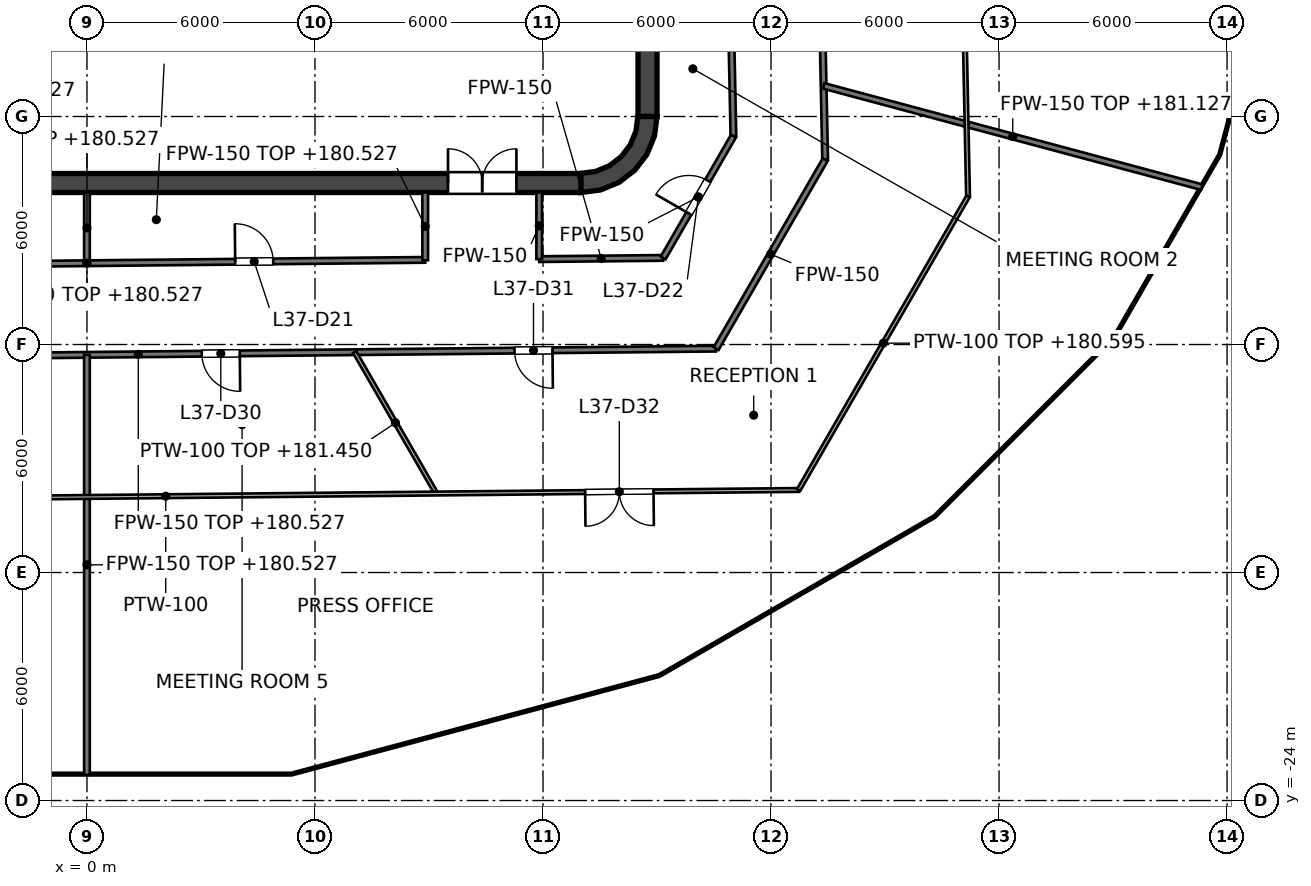
"""IFC4 building model, lengths in metres.
Left out: names, types, materials, properties, quantities, classifications, styles, units other than length and angle.
Written with IfcOpenShell. Run it as: python <this file> out.ifc"""

import sys

from ifc_helpers import new_model, si_unit, direction, frame, frame_2d, origin, place, context, subcontext, project, spatial, polyline, rectangle, outline, extrude, element, fill, save


model = new_model("IFC4")
c1 = context("Model", 3, precision=1e-05, world=origin(), true_north=direction((0.0, 1.0)))
c2 = subcontext(c1, "Body", "Model", "MODEL_VIEW")
j1 = project(units=[si_unit("LENGTHUNIT", "METRE"), si_unit("PLANEANGLEUNIT", "RADIAN")], contexts=[c1])
p1 = place(None, origin())
s1 = spatial("IfcSite", under=j1, at=p1, CompositionType="ELEMENT")
p2 = place(p1, origin())
s2 = spatial("IfcBuilding", under=s1, at=p2, CompositionType="ELEMENT")
p3 = place(p2, frame((0.0, 0.0, 177.6)))
s3 = spatial("IfcBuildingStorey", under=s2, at=p3, CompositionType="ELEMENT", Elevation=177.6)
p4 = place(p3, frame((-13.0, -7.75, 0.0), z_axis=(0.0, 0.0, 1.0), x_axis=(1.0, 0.0, 0.0)))
e1 = element("IfcWall", 1, at=p4, inside=s3, PredefinedType="SHEAR", context=c2, shape_type="SweptSolid", body=[
    extrude(rectangle(XDim=26.0, YDim=0.5, at=frame_2d((13.0, 0.0))), origin(), (0.0, 0.0, 1.0), 4.0),
])
p5 = place(p4, frame((1.7, 0.0, 0.0)))
e2 = element("IfcOpeningElement", 2, at=p5, cuts=e1, PredefinedType="OPENING", context=c2, shape_type="SweptSolid", body=[
    extrude(rectangle(XDim=1.8, YDim=2.1, at=frame_2d((0.9, 1.05))), frame((0.0, 0.25, 0.0), z_axis=(0.0, -1.0, 0.0), x_axis=(1.0, 0.0, 0.0)), (0.0, 0.0, 1.0), 0.5),
])
p6 = place(p4, frame((22.5, 0.0, 0.0)))
e3 = element("IfcOpeningElement", 3, at=p6, cuts=e1, PredefinedType="OPENING", context=c2, shape_type="SweptSolid", body=[
    extrude(rectangle(XDim=1.8, YDim=2.1, at=frame_2d((0.9, 1.05))), frame((0.0, 0.25, 0.0), z_axis=(0.0, -1.0, 0.0), x_axis=(1.0, 0.0, 0.0)), (0.0, 0.0, 1.0), 0.5),
])
p7 = place(p3, frame((14.75, -6.0, 0.0), z_axis=(0.0, 0.0, 1.0), x_axis=(0.0, 1.0, 0.0)))
e4 = element("IfcWall", 4, at=p7, inside=s3, PredefinedType="SHEAR", context=c2, shape_type="SweptSolid", body=[
    extrude(rectangle(XDim=12.0, YDim=0.5, at=frame_2d((6.0, 0.0))), origin(), (0.0, 0.0, 1.0), 4.0),
])
p8 = place(p3, origin())
e5 = element("IfcWall", 5, at=p8, inside=s3, PredefinedType="SHEAR", context=c2, shape_type="SweptSolid", body=[
    extrude(outline(polyline([(15.0, -6.0), (14.496, -6.0), (14.445, -6.387), (14.295, -6.748), (14.058, -7.058), (13.748, -7.295), (13.387, -7.445), (13.0, -7.496), (13.0, -8.0), (13.518, -7.932), (14.0, -7.732), (14.414, -7.414), (14.732, -7.0), (14.932, -6.518), (15.0, -6.0)])), origin(), (0.0, 0.0, 1.0), 4.0),
])
p9 = place(p3, frame((9.0, -6.6, 0.0), z_axis=(0.0, 0.0, 1.0), x_axis=(0.0, 1.0, 0.0)))
e6 = element("IfcWall", 6, at=p9, inside=s3, PredefinedType="SOLIDWALL", context=c2, shape_type="SweptSolid", body=[
    extrude(rectangle(XDim=2.5, YDim=0.25, at=frame_2d((1.25, 0.0))), origin(), (0.0, 0.0, 1.0), 3.85),
])
p10 = place(p9, frame((0.65, 0.0, 0.0)))
e7 = element("IfcOpeningElement", 7, at=p10, cuts=e6, PredefinedType="OPENING", context=c2, shape_type="SweptSolid", body=[
    extrude(rectangle(XDim=1.2, YDim=2.1, at=frame_2d((0.6, 1.05))), frame((0.0, 0.125, 0.0), z_axis=(0.0, -1.0, 0.0), x_axis=(1.0, 0.0, 0.0)), (0.0, 0.0, 1.0), 0.25),
])
p11 = place(p3, frame((3.15, -6.6, 0.0), z_axis=(0.0, 0.0, 1.0), x_axis=(0.0, 1.0, 0.0)))
e8 = element("IfcWall", 8, at=p11, inside=s3, PredefinedType="SOLIDWALL", context=c2, shape_type="SweptSolid", body=[
    extrude(rectangle(XDim=2.5, YDim=0.25, at=frame_2d((1.25, 0.0))), origin(), (0.0, 0.0, 1.0), 3.85),
])
p12 = place(p3, frame((-9.125, -7.05, 0.0), z_axis=(0.0, 0.0, 1.0), x_axis=(1.0, 0.0, 0.0)))
e9 = element("IfcWall", 9, at=p12, inside=s3, PredefinedType="SOLIDWALL", context=c2, shape_type="SweptSolid", body=[
    extrude(rectangle(XDim=18.25, YDim=0.9, at=frame_2d((9.125, 0.0))), origin(), (0.0, 0.0, 1.0), 3.85),
])
p13 = place(p3, frame((11.8, -7.5, 0.0), z_axis=(0.0, 0.0, 1.0), x_axis=(0.0, 1.0, 0.0)))
e10 = element("IfcWall", 10, at=p13, inside=s3, PredefinedType="SOLIDWALL", context=c2, shape_type="SweptSolid", body=[
    extrude(rectangle(XDim=15.0, YDim=0.4, at=frame_2d((7.5, 0.0))), origin(), (0.0, 0.0, 1.0), 3.85),
])
p14 = place(p13, frame((11.3, 0.0, 0.0)))
e11 = element("IfcOpeningElement", 11, at=p14, cuts=e10, PredefinedType="OPENING", context=c2, shape_type="SweptSolid", body=[
    extrude(rectangle(XDim=1.1, YDim=2.1, at=frame_2d((0.55, 1.05))), frame((0.0, 0.2, 0.0), z_axis=(0.0, -1.0, 0.0), x_axis=(1.0, 0.0, 0.0)), (0.0, 0.0, 1.0), 0.4),
])
p15 = place(p13, frame((8.4, 0.0, 0.0)))
e12 = element("IfcOpeningElement", 12, at=p15, cuts=e10, PredefinedType="OPENING", context=c2, shape_type="SweptSolid", body=[
    extrude(rectangle(XDim=1.1, YDim=2.1, at=frame_2d((0.55, 1.05))), frame((0.0, 0.2, 0.0), z_axis=(0.0, -1.0, 0.0), x_axis=(1.0, 0.0, 0.0)), (0.0, 0.0, 1.0), 0.4),
])
p16 = place(p13, frame((5.5, 0.0, 0.0)))
e13 = element("IfcOpeningElement", 13, at=p16, cuts=e10, PredefinedType="OPENING", context=c2, shape_type="SweptSolid", body=[
    extrude(rectangle(XDim=1.1, YDim=2.1, at=frame_2d((0.55, 1.05))), frame((0.0, 0.2, 0.0), z_axis=(0.0, -1.0, 0.0), x_axis=(1.0, 0.0, 0.0)), (0.0, 0.0, 1.0), 0.4),
])
p17 = place(p13, frame((13.697, 0.0, 0.0)))
e14 = element("IfcOpeningElement", 14, at=p17, cuts=e10, PredefinedType="OPENING", context=c2, shape_type="SweptSolid", body=[
    extrude(rectangle(XDim=0.9, YDim=2.1, at=frame_2d((0.45, 1.05))), frame((0.0, 0.2, 0.0), z_axis=(0.0, -1.0, 0.0), x_axis=(1.0, 0.0, 0.0)), (0.0, 0.0, 1.0), 0.4),
])
p18 = place(p13, frame((0.403, 0.0, 0.0)))
e15 = element("IfcOpeningElement", 15, at=p18, cuts=e10, PredefinedType="OPENING", context=c2, shape_type="SweptSolid", body=[
    extrude(rectangle(XDim=0.9, YDim=2.1, at=frame_2d((0.45, 1.05))), frame((0.0, 0.2, 0.0), z_axis=(0.0, -1.0, 0.0), x_axis=(1.0, 0.0, 0.0)), (0.0, 0.0, 1.0), 0.4),
])
e16 = element("IfcWall", 16, at=p8, inside=s3, PredefinedType="SOLIDWALL", context=c2, shape_type="SweptSolid", body=[
    extrude(outline(polyline([(12.0, -5.675), (12.0, -5.925), (14.25, -5.925), (14.5, -5.925), (14.5, -5.675), (14.5, -3.025), (14.5, -2.775), (14.5, -0.125), (14.5, 0.125), (14.5, 2.775), (14.5, 3.025), (14.5, 5.675), (14.5, 5.925), (14.25, 5.925), (12.0, 5.925), (12.0, 5.675), (14.25, 5.675), (14.25, 3.025), (12.0, 3.025), (12.0, 2.775), (14.25, 2.775), (14.25, 0.125), (12.0, 0.125), (12.0, -0.125), (14.25, -0.125), (14.25, -2.775), (12.0, -2.775), (12.0, -3.025), (14.25, -3.025), (14.25, -5.675), (12.0, -5.675)])), origin(), (0.0, 0.0, 1.0), 3.85),
])
p19 = place(p3, frame((16.708, 8.168, 0.0), z_axis=(0.0, 0.0, 1.0), x_axis=(0.020594135175, -0.999787918309, 0.0)))
e17 = element("IfcWall", 17, at=p19, inside=s3, PredefinedType="PARTITIONING", context=c2, shape_type="SweptSolid", body=[
    extrude(rectangle(XDim=14.688, YDim=0.15, at=frame_2d((7.344, 0.0))), origin(), (0.0, 0.0, 1.0), 2.927),
])
p20 = place(p19, frame((7.54, 0.0, 0.0)))
e18 = element("IfcOpeningElement", 18, at=p20, cuts=e17, PredefinedType="OPENING", context=c2, shape_type="SweptSolid", body=[
    extrude(rectangle(XDim=1.0, YDim=2.1, at=frame_2d((0.5, 1.05))), frame((0.0, 0.075, 0.0), z_axis=(0.0, -1.0, 0.0), x_axis=(1.0, 0.0, 0.0)), (0.0, 0.0, 1.0), 0.15),
])
p21 = place(p19, frame((2.44, 0.0, 0.0)))
e19 = element("IfcOpeningElement", 19, at=p21, cuts=e17, PredefinedType="OPENING", context=c2, shape_type="SweptSolid", body=[
    extrude(rectangle(XDim=1.0, YDim=2.1, at=frame_2d((0.5, 1.05))), frame((0.0, 0.075, 0.0), z_axis=(0.0, -1.0, 0.0), x_axis=(1.0, 0.0, 0.0)), (0.0, 0.0, 1.0), 0.15),
])
p22 = place(p3, frame((19.08, 9.57, 0.0), z_axis=(0.0, 0.0, 1.0), x_axis=(0.020585419538, -0.9997880978, 0.0)))
e20 = element("IfcWall", 20, at=p22, inside=s3, PredefinedType="PARTITIONING", context=c2, shape_type="SweptSolid", body=[
    extrude(rectangle(XDim=16.711, YDim=0.15, at=frame_2d((8.355, 0.0))), origin(), (0.0, 0.0, 1.0), 2.927),
])
p23 = place(p22, frame((7.805, 0.0, 0.0)))
e21 = element("IfcOpeningElement", 21, at=p23, cuts=e20, PredefinedType="OPENING", context=c2, shape_type="SweptSolid", body=[
    extrude(rectangle(XDim=1.0, YDim=2.1, at=frame_2d((0.5, 1.05))), frame((0.0, 0.075, 0.0), z_axis=(0.0, -1.0, 0.0), x_axis=(1.0, 0.0, 0.0)), (0.0, 0.0, 1.0), 0.15),
])
p24 = place(p3, frame((19.384, -5.194, 0.0), z_axis=(0.0, 0.0, 1.0), x_axis=(0.965946042089, -0.258743586919, 0.0)))
e22 = element("IfcWall", 22, at=p24, inside=s3, PredefinedType="PARTITIONING", context=c2, shape_type="SweptSolid", body=[
    extrude(rectangle(XDim=10.303, YDim=0.15, at=frame_2d((5.151, 0.0))), origin(), (0.0, 0.0, 1.0), 3.527),
])
p25 = place(p3, frame((-13.855, -12.409, 0.0), z_axis=(0.0, 0.0, 1.0), x_axis=(0.999951009258, 0.009898438446, 0.0)))
e23 = element("IfcWall", 23, at=p25, inside=s3, PredefinedType="PARTITIONING", context=c2, shape_type="SweptSolid", body=[
    extrude(rectangle(XDim=30.411, YDim=0.15, at=frame_2d((15.206, 0.0))), origin(), (0.0, 0.0, 1.0), 2.927),
])
p26 = place(p25, frame((16.877, 0.0, 0.0)))
e24 = element("IfcOpeningElement", 24, at=p26, cuts=e23, PredefinedType="OPENING", context=c2, shape_type="SweptSolid", body=[
    extrude(rectangle(XDim=1.0, YDim=2.1, at=frame_2d((0.5, 1.05))), frame((0.0, 0.075, 0.0), z_axis=(0.0, -1.0, 0.0), x_axis=(1.0, 0.0, 0.0)), (0.0, 0.0, 1.0), 0.15),
])
p27 = place(p25, frame((25.106, 0.0, 0.0)))
e25 = element("IfcOpeningElement", 25, at=p27, cuts=e23, PredefinedType="OPENING", context=c2, shape_type="SweptSolid", body=[
    extrude(rectangle(XDim=1.0, YDim=2.1, at=frame_2d((0.5, 1.05))), frame((0.0, 0.075, 0.0), z_axis=(0.0, -1.0, 0.0), x_axis=(1.0, 0.0, 0.0)), (0.0, 0.0, 1.0), 0.15),
])
p28 = place(p25, frame((1.937, 0.0, 0.0)))
e26 = element("IfcOpeningElement", 26, at=p28, cuts=e23, PredefinedType="OPENING", context=c2, shape_type="SweptSolid", body=[
    extrude(rectangle(XDim=1.0, YDim=2.1, at=frame_2d((0.5, 1.05))), frame((0.0, 0.075, 0.0), z_axis=(0.0, -1.0, 0.0), x_axis=(1.0, 0.0, 0.0)), (0.0, 0.0, 1.0), 0.15),
])
p29 = place(p25, frame((8.915, 0.0, 0.0)))
e27 = element("IfcOpeningElement", 27, at=p29, cuts=e23, PredefinedType="OPENING", context=c2, shape_type="SweptSolid", body=[
    extrude(rectangle(XDim=1.0, YDim=2.1, at=frame_2d((0.5, 1.05))), frame((0.0, 0.075, 0.0), z_axis=(0.0, -1.0, 0.0), x_axis=(1.0, 0.0, 0.0)), (0.0, 0.0, 1.0), 0.15),
])
p30 = place(p3, frame((-8.9, -9.949, 0.0), z_axis=(0.0, 0.0, 1.0), x_axis=(0.999950969978, 0.009902405776, 0.0)))
e28 = element("IfcWall", 28, at=p30, inside=s3, PredefinedType="PARTITIONING", context=c2, shape_type="SweptSolid", body=[
    extrude(rectangle(XDim=17.801, YDim=0.15, at=frame_2d((8.9, 0.0))), origin(), (0.0, 0.0, 1.0), 2.927),
])
p31 = place(p30, frame((3.9, 0.0, 0.0)))
e29 = element("IfcOpeningElement", 29, at=p31, cuts=e28, PredefinedType="OPENING", context=c2, shape_type="SweptSolid", body=[
    extrude(rectangle(XDim=1.0, YDim=2.1, at=frame_2d((0.5, 1.05))), frame((0.0, 0.075, 0.0), z_axis=(0.0, -1.0, 0.0), x_axis=(1.0, 0.0, 0.0)), (0.0, 0.0, 1.0), 0.15),
])
p32 = place(p30, frame((12.801, 0.0, 0.0)))
e30 = element("IfcOpeningElement", 30, at=p32, cuts=e28, PredefinedType="OPENING", context=c2, shape_type="SweptSolid", body=[
    extrude(rectangle(XDim=1.0, YDim=2.1, at=frame_2d((0.5, 1.05))), frame((0.0, 0.075, 0.0), z_axis=(0.0, -1.0, 0.0), x_axis=(1.0, 0.0, 0.0)), (0.0, 0.0, 1.0), 0.15),
])
p33 = place(p3, frame((11.9, -9.753, 0.0), z_axis=(0.0, 0.0, 1.0), x_axis=(0.999951172082, 0.009881976096, 0.0)))
e31 = element("IfcWall", 31, at=p33, inside=s3, PredefinedType="PARTITIONING", context=c2, shape_type="SweptSolid", body=[
    extrude(rectangle(XDim=3.261, YDim=0.15, at=frame_2d((1.631, 0.0))), origin(), (0.0, 0.0, 1.0), 2.995),
])
p34 = place(p3, frame((16.555, -12.107, 0.0), z_axis=(0.0, 0.0, 1.0), x_axis=(0.500014611105, 0.866016967894, 0.0)))
e32 = element("IfcWall", 32, at=p34, inside=s3, PredefinedType="PARTITIONING", context=c2, shape_type="SweptSolid", body=[
    extrude(rectangle(XDim=5.739, YDim=0.15, at=frame_2d((2.869, 0.0))), origin(), (0.0, 0.0, 1.0), 2.995),
])
p35 = place(p3, frame((15.161, -9.721, 0.0), z_axis=(0.0, 0.0, 1.0), x_axis=(0.500042316284, 0.866000971088, 0.0)))
e33 = element("IfcWall", 33, at=p35, inside=s3, PredefinedType="PARTITIONING", context=c2, shape_type="SweptSolid", body=[
    extrude(rectangle(XDim=3.7, YDim=0.15, at=frame_2d((1.85, 0.0))), origin(), (0.0, 0.0, 1.0), 2.995),
])
p36 = place(p35, frame((1.351, 0.0, 0.0)))
e34 = element("IfcOpeningElement", 34, at=p36, cuts=e33, PredefinedType="OPENING", context=c2, shape_type="SweptSolid", body=[
    extrude(rectangle(XDim=1.0, YDim=2.1, at=frame_2d((0.5, 1.05))), frame((0.0, 0.075, 0.0), z_axis=(0.0, -1.0, 0.0), x_axis=(1.0, 0.0, 0.0)), (0.0, 0.0, 1.0), 0.15),
])
p37 = place(p3, frame((11.9, -9.753, 0.0), z_axis=(0.0, 0.0, 1.0), x_axis=(0.0, 1.0, 0.0)))
e35 = element("IfcWall", 35, at=p37, inside=s3, PredefinedType="PARTITIONING", context=c2, shape_type="SweptSolid", body=[
    extrude(rectangle(XDim=1.753, YDim=0.15, at=frame_2d((0.876, 0.0))), origin(), (0.0, 0.0, 1.0), 2.995),
])
p38 = place(p3, frame((8.9, -9.783, 0.0), z_axis=(0.0, 0.0, 1.0), x_axis=(0.0, 1.0, 0.0)))
e36 = element("IfcWall", 36, at=p38, inside=s3, PredefinedType="PARTITIONING", context=c2, shape_type="SweptSolid", body=[
    extrude(rectangle(XDim=1.783, YDim=0.15, at=frame_2d((0.892, 0.0))), origin(), (0.0, 0.0, 1.0), 2.927),
])
p39 = place(p3, frame((0.0, -23.325, 0.0), z_axis=(0.0, 0.0, 1.0), x_axis=(0.0, 1.0, 0.0)))
e37 = element("IfcWall", 37, at=p39, inside=s3, PredefinedType="PARTITIONING", context=c2, shape_type="SweptSolid", body=[
    extrude(rectangle(XDim=11.054, YDim=0.15, at=frame_2d((5.527, 0.0))), origin(), (0.0, 0.0, 1.0), 2.927),
])
p40 = place(p3, frame((0.0, -9.861, 0.0), z_axis=(0.0, 0.0, 1.0), x_axis=(0.0, 1.0, 0.0)))
e38 = element("IfcWall", 38, at=p40, inside=s3, PredefinedType="PARTITIONING", context=c2, shape_type="SweptSolid", body=[
    extrude(rectangle(XDim=1.861, YDim=0.15, at=frame_2d((0.931, 0.0))), origin(), (0.0, 0.0, 1.0), 2.927),
])
p41 = place(p3, frame((22.776, 11.754, 0.0), z_axis=(0.0, 0.0, 1.0), x_axis=(0.020565153385, -0.99978851487, 0.0)))
e39 = element("IfcWall", 39, at=p41, inside=s3, PredefinedType="PARTITIONING", context=c2, shape_type="SweptSolid", body=[
    extrude(rectangle(XDim=19.861, YDim=0.1, at=frame_2d((9.931, 0.0))), origin(), (0.0, 0.0, 1.0), 2.927),
])
p42 = place(p41, frame((8.031, 0.0, 0.0)))
e40 = element("IfcOpeningElement", 40, at=p42, cuts=e39, PredefinedType="OPENING", context=c2, shape_type="SweptSolid", body=[
    extrude(rectangle(XDim=1.8, YDim=2.1, at=frame_2d((0.9, 1.05))), frame((0.0, 0.05, 0.0), z_axis=(0.0, -1.0, 0.0), x_axis=(1.0, 0.0, 0.0)), (0.0, 0.0, 1.0), 0.1),
])
p43 = place(p3, frame((7.044, -12.201, 0.0), z_axis=(0.0, 0.0, 1.0), x_axis=(0.500038958046, -0.866002910178, 0.0)))
e41 = element("IfcWall", 41, at=p43, inside=s3, PredefinedType="PARTITIONING", context=c2, shape_type="SweptSolid", body=[
    extrude(rectangle(XDim=4.296, YDim=0.1, at=frame_2d((2.148, 0.0))), origin(), (0.0, 0.0, 1.0), 3.85),
])
p44 = place(p3, frame((-14.582, -16.156, 0.0), z_axis=(0.0, 0.0, 1.0), x_axis=(0.999951338757, 0.009865095958, 0.0)))
e42 = element("IfcWall", 42, at=p44, inside=s3, PredefinedType="PARTITIONING", context=c2, shape_type="SweptSolid", body=[
    extrude(rectangle(XDim=33.311, YDim=0.1, at=frame_2d((16.655, 0.0))), origin(), (0.0, 0.0, 1.0), 2.927),
])
p45 = place(p44, frame((27.692, 0.0, 0.0)))
e43 = element("IfcOpeningElement", 43, at=p45, cuts=e42, PredefinedType="OPENING", context=c2, shape_type="SweptSolid", body=[
    extrude(rectangle(XDim=1.8, YDim=2.1, at=frame_2d((0.9, 1.05))), frame((0.0, 0.05, 0.0), z_axis=(0.0, -1.0, 0.0), x_axis=(1.0, 0.0, 0.0)), (0.0, 0.0, 1.0), 0.1),
])
p46 = place(p44, frame((8.273, 0.0, 0.0)))
e44 = element("IfcOpeningElement", 44, at=p46, cuts=e42, PredefinedType="OPENING", context=c2, shape_type="SweptSolid", body=[
    extrude(rectangle(XDim=0.9, YDim=2.1, at=frame_2d((0.45, 1.05))), frame((0.0, 0.05, 0.0), z_axis=(0.0, -1.0, 0.0), x_axis=(1.0, 0.0, 0.0)), (0.0, 0.0, 1.0), 0.1),
])
p47 = place(p3, frame((18.727, -15.826, 0.0), z_axis=(0.0, 0.0, 1.0), x_axis=(0.499931804057, 0.866064773151, 0.0)))
e45 = element("IfcWall", 45, at=p47, inside=s3, PredefinedType="PARTITIONING", context=c2, shape_type="SweptSolid", body=[
    extrude(rectangle(XDim=8.917, YDim=0.1, at=frame_2d((4.458, 0.0))), origin(), (0.0, 0.0, 1.0), 2.995),
])
p48 = place(p10, origin())
e46 = element("IfcDoor", 46, at=p48, inside=s3, OperationType="SINGLE_SWING_LEFT", PredefinedType="DOOR", context=c2, shape_type="SweptSolid", body=[
    extrude(rectangle(XDim=1.2, YDim=2.1, at=frame_2d((0.6, 1.05))), frame((0.0, 0.025, 0.0), z_axis=(0.0, -1.0, 0.0), x_axis=(1.0, 0.0, 0.0)), (0.0, 0.0, 1.0), 0.05),
])
fill(e7, e46)
p49 = place(p18, origin())
e47 = element("IfcDoor", 47, at=p49, inside=s3, OperationType="SINGLE_SWING_RIGHT", PredefinedType="DOOR", context=c2, shape_type="SweptSolid", body=[
    extrude(rectangle(XDim=0.9, YDim=2.1, at=frame_2d((0.45, 1.05))), frame((0.0, 0.025, 0.0), z_axis=(0.0, -1.0, 0.0), x_axis=(1.0, 0.0, 0.0)), (0.0, 0.0, 1.0), 0.05),
])
fill(e15, e47)
p50 = place(p6, origin())
e48 = element("IfcDoor", 48, at=p50, inside=s3, OperationType="DOUBLE_DOOR_SINGLE_SWING", PredefinedType="DOOR", context=c2, shape_type="SweptSolid", body=[
    extrude(rectangle(XDim=1.8, YDim=2.1, at=frame_2d((0.9, 1.05))), frame((0.0, 0.025, 0.0), z_axis=(0.0, -1.0, 0.0), x_axis=(1.0, 0.0, 0.0)), (0.0, 0.0, 1.0), 0.05),
])
fill(e3, e48)
p51 = place(p32, origin())
e49 = element("IfcDoor", 49, at=p51, inside=s3, OperationType="SINGLE_SWING_LEFT", PredefinedType="DOOR", context=c2, shape_type="SweptSolid", body=[
    extrude(rectangle(XDim=1.0, YDim=2.1, at=frame_2d((0.5, 1.05))), frame((0.0, 0.025, 0.0), z_axis=(0.0, -1.0, 0.0), x_axis=(1.0, 0.0, 0.0)), (0.0, 0.0, 1.0), 0.05),
])
fill(e30, e49)
p52 = place(p36, origin())
e50 = element("IfcDoor", 50, at=p52, inside=s3, OperationType="SINGLE_SWING_LEFT", PredefinedType="DOOR", context=c2, shape_type="SweptSolid", body=[
    extrude(rectangle(XDim=1.0, YDim=2.1, at=frame_2d((0.5, 1.05))), frame((0.0, 0.025, 0.0), z_axis=(0.0, -1.0, 0.0), x_axis=(1.0, 0.0, 0.0)), (0.0, 0.0, 1.0), 0.05),
])
fill(e34, e50)
p53 = place(p26, origin())
e51 = element("IfcDoor", 51, at=p53, inside=s3, OperationType="SINGLE_SWING_RIGHT", PredefinedType="DOOR", context=c2, shape_type="SweptSolid", body=[
    extrude(rectangle(XDim=1.0, YDim=2.1, at=frame_2d((0.5, 1.05))), frame((0.0, 0.025, 0.0), z_axis=(0.0, -1.0, 0.0), x_axis=(1.0, 0.0, 0.0)), (0.0, 0.0, 1.0), 0.05),
])
fill(e24, e51)
p54 = place(p27, origin())
e52 = element("IfcDoor", 52, at=p54, inside=s3, OperationType="SINGLE_SWING_RIGHT", PredefinedType="DOOR", context=c2, shape_type="SweptSolid", body=[
    extrude(rectangle(XDim=1.0, YDim=2.1, at=frame_2d((0.5, 1.05))), frame((0.0, 0.025, 0.0), z_axis=(0.0, -1.0, 0.0), x_axis=(1.0, 0.0, 0.0)), (0.0, 0.0, 1.0), 0.05),
])
fill(e25, e52)
p55 = place(p45, origin())
e53 = element("IfcDoor", 53, at=p55, inside=s3, OperationType="DOUBLE_DOOR_SINGLE_SWING", PredefinedType="DOOR", context=c2, shape_type="SweptSolid", body=[
    extrude(rectangle(XDim=1.8, YDim=2.1, at=frame_2d((0.9, 1.05))), frame((0.0, 0.025, 0.0), z_axis=(0.0, -1.0, 0.0), x_axis=(1.0, 0.0, 0.0)), (0.0, 0.0, 1.0), 0.05),
])
fill(e43, e53)
save(model, sys.argv[1])
